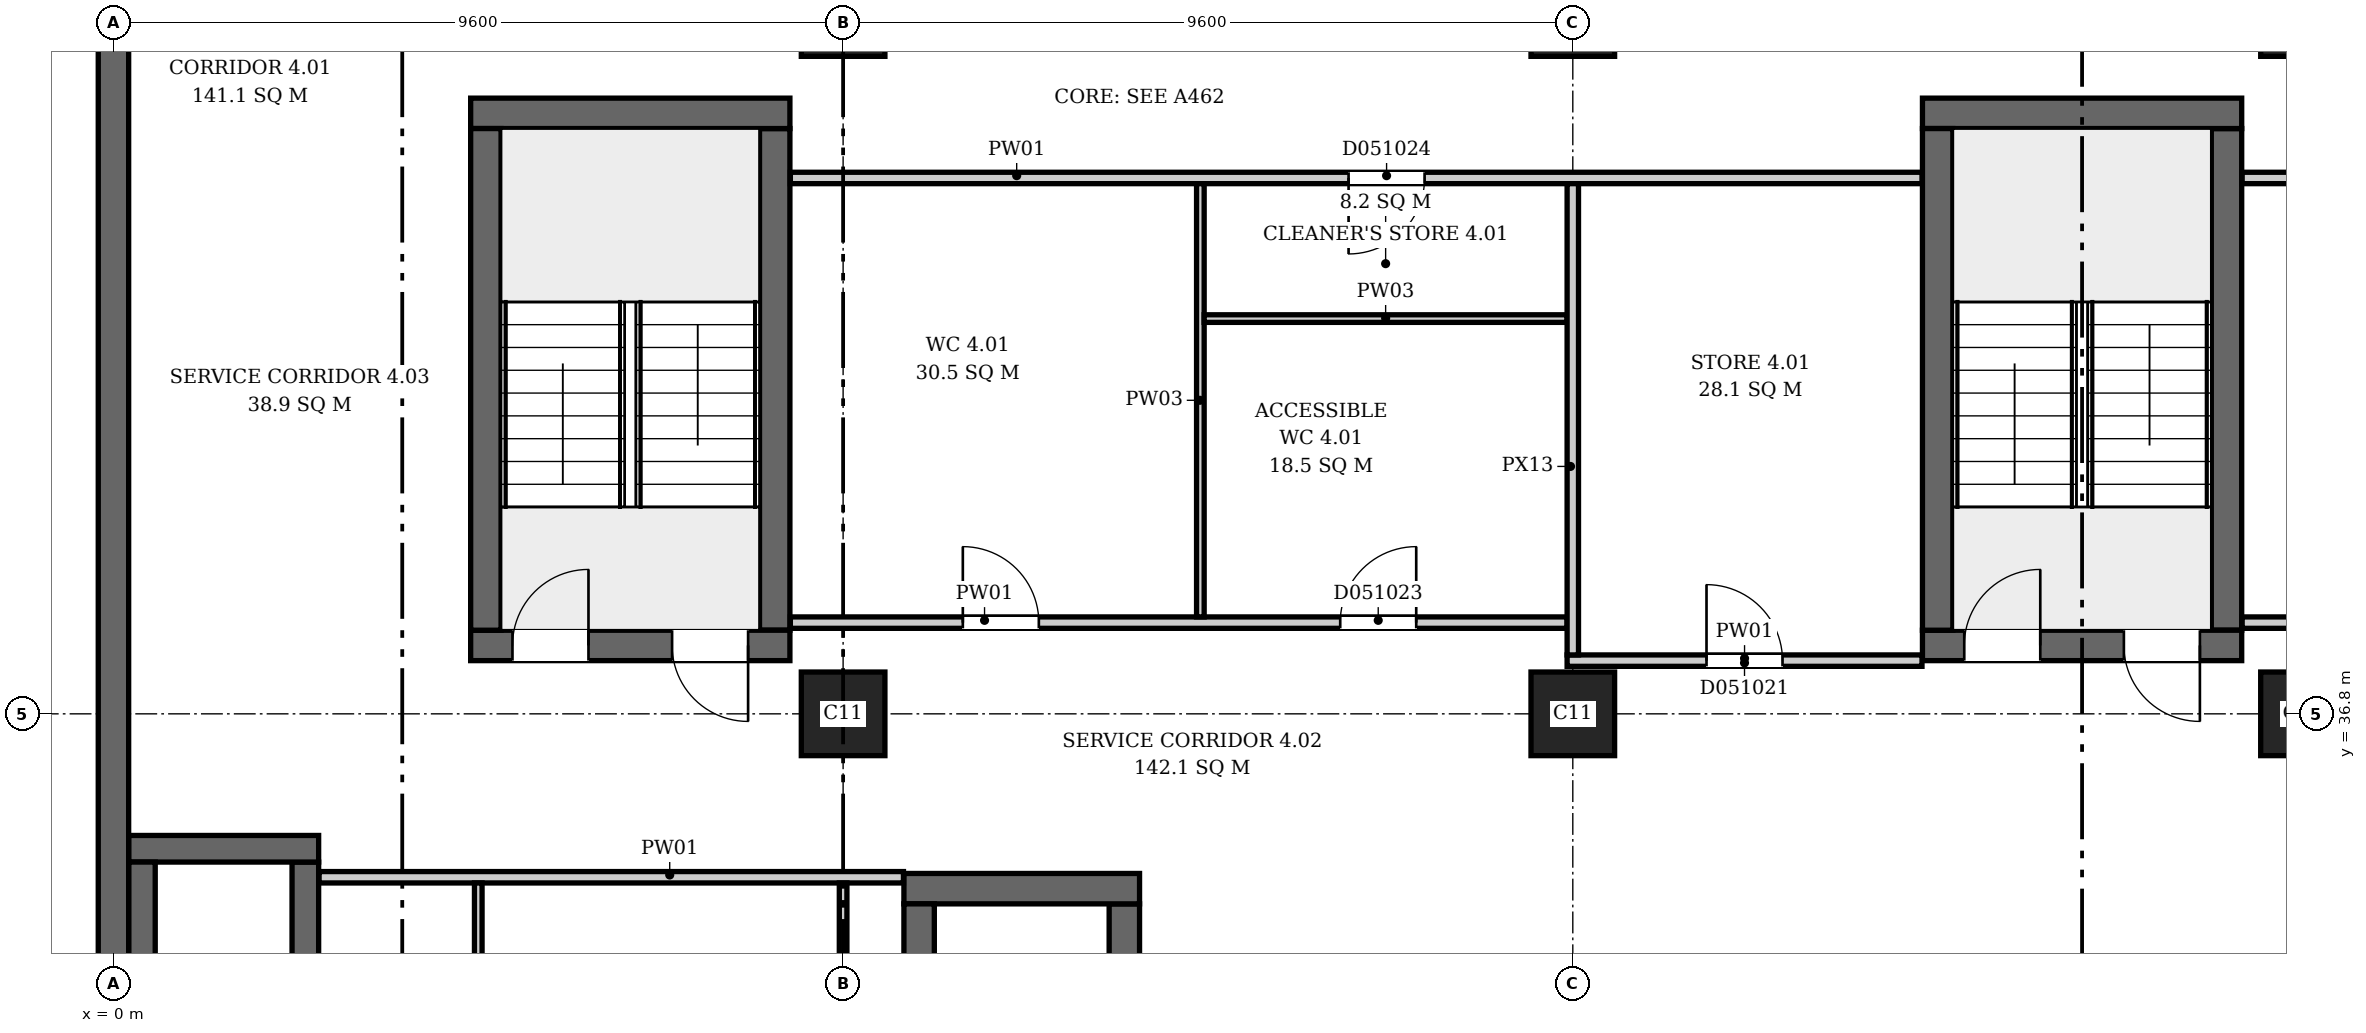
"""IFC4 building model, lengths in metres.
Left out: names, types, materials, properties, quantities, classifications, styles, units other than length and angle.
Written with IfcOpenShell. Run it as: python <this file> out.ifc"""

import sys

from ifc_helpers import new_model, si_unit, direction, frame, frame_2d, origin, origin_2d, place, context, subcontext, project, spatial, rectangle, extrude, element, fill, save


model = new_model("IFC4")
c1 = context("Model", 3, precision=1e-05, world=origin(), true_north=direction((0.0, 1.0)))
c2 = subcontext(c1, "Body", "Model", "MODEL_VIEW")
j1 = project(units=[si_unit("LENGTHUNIT", "METRE"), si_unit("PLANEANGLEUNIT", "RADIAN")], contexts=[c1])
p1 = place(None, origin())
s1 = spatial("IfcSite", under=j1, at=p1, CompositionType="ELEMENT")
p2 = place(p1, origin())
s2 = spatial("IfcBuilding", under=s1, at=p2, CompositionType="ELEMENT")
p3 = place(p2, frame((0.0, 0.0, 26.7)))
s3 = spatial("IfcBuildingStorey", under=s2, at=p3, CompositionType="ELEMENT", Elevation=26.7)
p4 = place(p3, frame((0.0, -0.2, 0.0), z_axis=(0.0, 0.0, 1.0), x_axis=(0.0, 1.0, 0.0)))
e1 = element("IfcWall", 1, at=p4, inside=s3, PredefinedType="SHEAR", context=c2, shape_type="SweptSolid", body=[
    extrude(rectangle(XDim=46.88, YDim=0.4, at=frame_2d((23.44, 0.0))), origin(), (0.0, 0.0, 1.0), 5.2),
])
p5 = place(p3, frame((4.7, 37.7, 0.0), z_axis=(0.0, 0.0, 1.0), x_axis=(1.0, 0.0, 0.0)))
e2 = element("IfcWall", 2, at=p5, inside=s3, PredefinedType="SHEAR", context=c2, shape_type="SweptSolid", body=[
    extrude(rectangle(XDim=4.2, YDim=0.4, at=frame_2d((2.1, 0.0))), origin(), (0.0, 0.0, 1.0), 5.2),
])
p6 = place(p5, frame((0.55, 0.0, 0.0)))
e3 = element("IfcOpeningElement", 3, at=p6, cuts=e2, PredefinedType="OPENING", context=c2, shape_type="SweptSolid", body=[
    extrude(rectangle(XDim=1.0, YDim=2.1, at=frame_2d((0.5, 1.05))), frame((0.0, 0.21, 0.0), z_axis=(0.0, -1.0, 0.0), x_axis=(1.0, 0.0, 0.0)), (0.0, 0.0, 1.0), 0.42),
])
p7 = place(p5, frame((2.65, 0.0, 0.0)))
e4 = element("IfcOpeningElement", 4, at=p7, cuts=e2, PredefinedType="OPENING", context=c2, shape_type="SweptSolid", body=[
    extrude(rectangle(XDim=1.0, YDim=2.1, at=frame_2d((0.5, 1.05))), frame((0.0, 0.21, 0.0), z_axis=(0.0, -1.0, 0.0), x_axis=(1.0, 0.0, 0.0)), (0.0, 0.0, 1.0), 0.42),
])
p8 = place(p3, frame((4.7, 44.7, 0.0), z_axis=(0.0, 0.0, 1.0), x_axis=(1.0, 0.0, 0.0)))
e5 = element("IfcWall", 5, at=p8, inside=s3, PredefinedType="SHEAR", context=c2, shape_type="SweptSolid", body=[
    extrude(rectangle(XDim=4.2, YDim=0.4, at=frame_2d((2.1, 0.0))), origin(), (0.0, 0.0, 1.0), 5.2),
])
for number, where, z_axis, x_axis in (
    (6, (4.9, 37.9, 0.0), (0.0, 0.0, 1.0), (0.0, 1.0, 0.0)),
    (7, (8.7, 37.9, 0.0), (0.0, 0.0, 1.0), (0.0, 1.0, 0.0)),
):
    element("IfcWall", number, at=place(p3, frame(where, z_axis=z_axis, x_axis=x_axis)), inside=s3, PredefinedType="SHEAR", context=c2, shape_type="SweptSolid", body=[
        extrude(rectangle(XDim=6.6, YDim=0.4, at=frame_2d((3.3, 0.0))), origin(), (0.0, 0.0, 1.0), 5.2),
    ])
p9 = place(p3, frame((23.8, 37.7, 0.0), z_axis=(0.0, 0.0, 1.0), x_axis=(1.0, 0.0, 0.0)))
e8 = element("IfcWall", 8, at=p9, inside=s3, PredefinedType="SHEAR", context=c2, shape_type="SweptSolid", body=[
    extrude(rectangle(XDim=4.2, YDim=0.4, at=frame_2d((2.1, 0.0))), origin(), (0.0, 0.0, 1.0), 5.2),
])
p10 = place(p9, frame((0.55, 0.0, 0.0)))
e9 = element("IfcOpeningElement", 9, at=p10, cuts=e8, PredefinedType="OPENING", context=c2, shape_type="SweptSolid", body=[
    extrude(rectangle(XDim=1.0, YDim=2.1, at=frame_2d((0.5, 1.05))), frame((0.0, 0.21, 0.0), z_axis=(0.0, -1.0, 0.0), x_axis=(1.0, 0.0, 0.0)), (0.0, 0.0, 1.0), 0.42),
])
p11 = place(p9, frame((2.65, 0.0, 0.0)))
e10 = element("IfcOpeningElement", 10, at=p11, cuts=e8, PredefinedType="OPENING", context=c2, shape_type="SweptSolid", body=[
    extrude(rectangle(XDim=1.0, YDim=2.1, at=frame_2d((0.5, 1.05))), frame((0.0, 0.21, 0.0), z_axis=(0.0, -1.0, 0.0), x_axis=(1.0, 0.0, 0.0)), (0.0, 0.0, 1.0), 0.42),
])
p12 = place(p3, frame((23.8, 44.7, 0.0), z_axis=(0.0, 0.0, 1.0), x_axis=(1.0, 0.0, 0.0)))
e11 = element("IfcWall", 11, at=p12, inside=s3, PredefinedType="SHEAR", context=c2, shape_type="SweptSolid", body=[
    extrude(rectangle(XDim=4.2, YDim=0.4, at=frame_2d((2.1, 0.0))), origin(), (0.0, 0.0, 1.0), 5.2),
])
for number, where, z_axis, x_axis in (
    (12, (24.0, 37.9, 0.0), (0.0, 0.0, 1.0), (0.0, 1.0, 0.0)),
    (13, (27.8, 37.9, 0.0), (0.0, 0.0, 1.0), (0.0, 1.0, 0.0)),
):
    element("IfcWall", number, at=place(p3, frame(where, z_axis=z_axis, x_axis=x_axis)), inside=s3, PredefinedType="SHEAR", context=c2, shape_type="SweptSolid", body=[
        extrude(rectangle(XDim=6.6, YDim=0.4, at=frame_2d((3.3, 0.0))), origin(), (0.0, 0.0, 1.0), 5.2),
    ])
p13 = place(p3, frame((0.2, 35.025, 0.0), z_axis=(0.0, 0.0, 1.0), x_axis=(1.0, 0.0, 0.0)))
e14 = element("IfcWall", 14, at=p13, inside=s3, PredefinedType="SHEAR", context=c2, shape_type="SweptSolid", body=[
    extrude(rectangle(XDim=2.5, YDim=0.35, at=frame_2d((1.25, 0.0))), origin(), (0.0, 0.0, 1.0), 5.2),
])
for number, where, z_axis, x_axis in (
    (15, (0.375, 31.35, 0.0), (0.0, 0.0, 1.0), (0.0, 1.0, 0.0)),
    (16, (2.525, 31.35, 0.0), (0.0, 0.0, 1.0), (0.0, 1.0, 0.0)),
):
    element("IfcWall", number, at=place(p3, frame(where, z_axis=z_axis, x_axis=x_axis)), inside=s3, PredefinedType="SHEAR", context=c2, shape_type="SweptSolid", body=[
        extrude(rectangle(XDim=3.5, YDim=0.35, at=frame_2d((1.75, 0.0))), origin(), (0.0, 0.0, 1.0), 5.2),
    ])
p14 = place(p3, frame((10.4, 34.5, 0.0), z_axis=(0.0, 0.0, 1.0), x_axis=(1.0, 0.0, 0.0)))
e17 = element("IfcWall", 17, at=p14, inside=s3, PredefinedType="SHEAR", context=c2, shape_type="SweptSolid", body=[
    extrude(rectangle(XDim=3.1, YDim=0.4, at=frame_2d((1.55, 0.0))), origin(), (0.0, 0.0, 1.0), 5.2),
])
for number, where, z_axis, x_axis in (
    (18, (10.6, 30.9, 0.0), (0.0, 0.0, 1.0), (0.0, 1.0, 0.0)),
    (19, (13.3, 30.9, 0.0), (0.0, 0.0, 1.0), (0.0, 1.0, 0.0)),
):
    element("IfcWall", number, at=place(p3, frame(where, z_axis=z_axis, x_axis=x_axis)), inside=s3, PredefinedType="SHEAR", context=c2, shape_type="SweptSolid", body=[
        extrude(rectangle(XDim=3.4, YDim=0.4, at=frame_2d((1.7, 0.0))), origin(), (0.0, 0.0, 1.0), 5.2),
    ])
for number, where, z_axis, x_axis in (
    (20, (9.6, 36.8, 0.0), (0.0, 0.0, 1.0), (1.0, 0.0, 0.0)),
    (21, (19.2, 36.8, 0.0), (0.0, 0.0, 1.0), (1.0, 0.0, 0.0)),
    (22, (28.8, 36.8, 0.0), (0.0, 0.0, 1.0), (1.0, 0.0, 0.0)),
    (23, (9.6, 46.0, 0.0), (0.0, 0.0, 1.0), (1.0, 0.0, 0.0)),
    (24, (19.2, 46.0, 0.0), (0.0, 0.0, 1.0), (1.0, 0.0, 0.0)),
    (25, (28.8, 46.0, 0.0), (0.0, 0.0, 1.0), (1.0, 0.0, 0.0)),
):
    element("IfcColumn", number, at=place(p3, frame(where, z_axis=z_axis, x_axis=x_axis)), inside=s3, PredefinedType="COLUMN", context=c2, shape_type="SweptSolid", body=[
        extrude(rectangle(XDim=1.1, YDim=1.1, at=origin_2d()), origin(), (0.0, 0.0, 1.0), 5.2),
    ])
p15 = place(p3, frame((2.706, 34.65, 0.0), z_axis=(0.0, 0.0, 1.0), x_axis=(1.0, 0.0, 0.0)))
e26 = element("IfcWall", 26, at=p15, inside=s3, PredefinedType="PARTITIONING", context=c2, shape_type="SweptSolid", body=[
    extrude(rectangle(XDim=7.688, YDim=0.15, at=frame_2d((3.844, 0.0))), origin(), (0.0, 0.0, 1.0), 4.85),
])
p16 = place(p3, frame((4.8, 25.175, 0.0), z_axis=(0.0, 0.0, 1.0), x_axis=(0.0, 1.0, 0.0)))
e27 = element("IfcWall", 27, at=p16, inside=s3, PredefinedType="PARTITIONING", context=c2, shape_type="SweptSolid", body=[
    extrude(rectangle(XDim=9.4, YDim=0.1, at=frame_2d((4.7, 0.0))), origin(), (0.0, 0.0, 1.0), 4.85),
])
p17 = place(p3, frame((8.906, 38.0, 0.0), z_axis=(0.0, 0.0, 1.0), x_axis=(1.0, 0.0, 0.0)))
e28 = element("IfcWall", 28, at=p17, inside=s3, PredefinedType="PARTITIONING", context=c2, shape_type="SweptSolid", body=[
    extrude(rectangle(XDim=10.219, YDim=0.15, at=frame_2d((5.109, 0.0))), origin(), (0.0, 0.0, 1.0), 4.85),
])
p18 = place(p17, frame((2.269, 0.0, 0.0)))
e29 = element("IfcOpeningElement", 29, at=p18, cuts=e28, PredefinedType="OPENING", context=c2, shape_type="SweptSolid", body=[
    extrude(rectangle(XDim=1.0, YDim=2.1, at=frame_2d((0.5, 1.05))), frame((0.0, 0.085, 0.0), z_axis=(0.0, -1.0, 0.0), x_axis=(1.0, 0.0, 0.0)), (0.0, 0.0, 1.0), 0.17),
])
p19 = place(p17, frame((7.234, 0.0, 0.0)))
e30 = element("IfcOpeningElement", 30, at=p19, cuts=e28, PredefinedType="OPENING", context=c2, shape_type="SweptSolid", body=[
    extrude(rectangle(XDim=1.0, YDim=2.1, at=frame_2d((0.5, 1.05))), frame((0.0, 0.085, 0.0), z_axis=(0.0, -1.0, 0.0), x_axis=(1.0, 0.0, 0.0)), (0.0, 0.0, 1.0), 0.17),
])
p20 = place(p3, frame((8.906, 43.85, 0.0), z_axis=(0.0, 0.0, 1.0), x_axis=(1.0, 0.0, 0.0)))
e31 = element("IfcWall", 31, at=p20, inside=s3, PredefinedType="PARTITIONING", context=c2, shape_type="SweptSolid", body=[
    extrude(rectangle(XDim=14.888, YDim=0.15, at=frame_2d((7.444, 0.0))), origin(), (0.0, 0.0, 1.0), 4.85),
])
p21 = place(p20, frame((7.344, 0.0, 0.0)))
e32 = element("IfcOpeningElement", 32, at=p21, cuts=e31, PredefinedType="OPENING", context=c2, shape_type="SweptSolid", body=[
    extrude(rectangle(XDim=1.0, YDim=2.1, at=frame_2d((0.5, 1.05))), frame((0.0, 0.085, 0.0), z_axis=(0.0, -1.0, 0.0), x_axis=(1.0, 0.0, 0.0)), (0.0, 0.0, 1.0), 0.17),
])
p22 = place(p3, frame((9.6, 31.075, 0.0), z_axis=(0.0, 0.0, 1.0), x_axis=(0.0, 1.0, 0.0)))
e33 = element("IfcWall", 33, at=p22, inside=s3, PredefinedType="PARTITIONING", context=c2, shape_type="SweptSolid", body=[
    extrude(rectangle(XDim=3.5, YDim=0.1, at=frame_2d((1.75, 0.0))), origin(), (0.0, 0.0, 1.0), 4.45),
])
p23 = place(p3, frame((14.3, 38.075, 0.0), z_axis=(0.0, 0.0, 1.0), x_axis=(0.0, 1.0, 0.0)))
e34 = element("IfcWall", 34, at=p23, inside=s3, PredefinedType="PARTITIONING", context=c2, shape_type="SweptSolid", body=[
    extrude(rectangle(XDim=5.7, YDim=0.1, at=frame_2d((2.85, 0.0))), origin(), (0.0, 0.0, 1.0), 4.85),
])
p24 = place(p3, frame((14.35, 42.0, 0.0), z_axis=(0.0, 0.0, 1.0), x_axis=(1.0, 0.0, 0.0)))
e35 = element("IfcWall", 35, at=p24, inside=s3, PredefinedType="PARTITIONING", context=c2, shape_type="SweptSolid", body=[
    extrude(rectangle(XDim=4.775, YDim=0.1, at=frame_2d((2.387, 0.0))), origin(), (0.0, 0.0, 1.0), 4.85),
])
p25 = place(p3, frame((19.125, 37.5, 0.0), z_axis=(0.0, 0.0, 1.0), x_axis=(1.0, 0.0, 0.0)))
e36 = element("IfcWall", 36, at=p25, inside=s3, PredefinedType="PARTITIONING", context=c2, shape_type="SweptSolid", body=[
    extrude(rectangle(XDim=4.669, YDim=0.15, at=frame_2d((2.334, 0.0))), origin(), (0.0, 0.0, 1.0), 4.85),
])
p26 = place(p25, frame((1.834, 0.0, 0.0)))
e37 = element("IfcOpeningElement", 37, at=p26, cuts=e36, PredefinedType="OPENING", context=c2, shape_type="SweptSolid", body=[
    extrude(rectangle(XDim=1.0, YDim=2.1, at=frame_2d((0.5, 1.05))), frame((0.0, 0.085, 0.0), z_axis=(0.0, -1.0, 0.0), x_axis=(1.0, 0.0, 0.0)), (0.0, 0.0, 1.0), 0.17),
])
p27 = place(p3, frame((19.2, 37.575, 0.0), z_axis=(0.0, 0.0, 1.0), x_axis=(0.0, 1.0, 0.0)))
e38 = element("IfcWall", 38, at=p27, inside=s3, PredefinedType="PARTITIONING", context=c2, shape_type="SweptSolid", body=[
    extrude(rectangle(XDim=6.2, YDim=0.15, at=frame_2d((3.1, 0.0))), origin(), (0.0, 0.0, 1.0), 4.45),
])
p28 = place(p3, frame((28.006, 38.0, 0.0), z_axis=(0.0, 0.0, 1.0), x_axis=(1.0, 0.0, 0.0)))
e39 = element("IfcWall", 39, at=p28, inside=s3, PredefinedType="PARTITIONING", context=c2, shape_type="SweptSolid", body=[
    extrude(rectangle(XDim=1.919, YDim=0.15, at=frame_2d((0.959, 0.0))), origin(), (0.0, 0.0, 1.0), 4.85),
])
p29 = place(p3, frame((28.006, 43.85, 0.0), z_axis=(0.0, 0.0, 1.0), x_axis=(1.0, 0.0, 0.0)))
e40 = element("IfcWall", 40, at=p29, inside=s3, PredefinedType="PARTITIONING", context=c2, shape_type="SweptSolid", body=[
    extrude(rectangle(XDim=29.388, YDim=0.15, at=frame_2d((14.694, 0.0))), origin(), (0.0, 0.0, 1.0), 4.85),
])
p30 = place(p6, origin())
e41 = element("IfcDoor", 41, at=p30, inside=s3, OperationType="SINGLE_SWING_RIGHT", PredefinedType="DOOR", context=c2, shape_type="SweptSolid", body=[
    extrude(rectangle(XDim=1.0, YDim=2.1, at=frame_2d((0.5, 1.05))), frame((0.0, 0.025, 0.0), z_axis=(0.0, -1.0, 0.0), x_axis=(1.0, 0.0, 0.0)), (0.0, 0.0, 1.0), 0.05),
])
fill(e3, e41)
p31 = place(p7, origin())
e42 = element("IfcDoor", 42, at=p31, inside=s3, OperationType="SINGLE_SWING_LEFT", PredefinedType="DOOR", context=c2, shape_type="SweptSolid", body=[
    extrude(rectangle(XDim=1.0, YDim=2.1, at=frame_2d((0.5, 1.05))), frame((0.0, 0.025, 0.0), z_axis=(0.0, -1.0, 0.0), x_axis=(1.0, 0.0, 0.0)), (0.0, 0.0, 1.0), 0.05),
])
fill(e4, e42)
p32 = place(p10, origin())
e43 = element("IfcDoor", 43, at=p32, inside=s3, OperationType="SINGLE_SWING_RIGHT", PredefinedType="DOOR", context=c2, shape_type="SweptSolid", body=[
    extrude(rectangle(XDim=1.0, YDim=2.1, at=frame_2d((0.5, 1.05))), frame((0.0, 0.025, 0.0), z_axis=(0.0, -1.0, 0.0), x_axis=(1.0, 0.0, 0.0)), (0.0, 0.0, 1.0), 0.05),
])
fill(e9, e43)
p33 = place(p11, origin())
e44 = element("IfcDoor", 44, at=p33, inside=s3, OperationType="SINGLE_SWING_LEFT", PredefinedType="DOOR", context=c2, shape_type="SweptSolid", body=[
    extrude(rectangle(XDim=1.0, YDim=2.1, at=frame_2d((0.5, 1.05))), frame((0.0, 0.025, 0.0), z_axis=(0.0, -1.0, 0.0), x_axis=(1.0, 0.0, 0.0)), (0.0, 0.0, 1.0), 0.05),
])
fill(e10, e44)
p34 = place(p26, origin())
e45 = element("IfcDoor", 45, at=p34, inside=s3, OperationType="SINGLE_SWING_LEFT", PredefinedType="DOOR", context=c2, shape_type="SweptSolid", body=[
    extrude(rectangle(XDim=1.0, YDim=2.1, at=frame_2d((0.5, 1.05))), frame((0.0, 0.025, 0.0), z_axis=(0.0, -1.0, 0.0), x_axis=(1.0, 0.0, 0.0)), (0.0, 0.0, 1.0), 0.05),
])
fill(e37, e45)
p35 = place(p18, origin())
e46 = element("IfcDoor", 46, at=p35, inside=s3, OperationType="SINGLE_SWING_LEFT", PredefinedType="DOOR", context=c2, shape_type="SweptSolid", body=[
    extrude(rectangle(XDim=1.0, YDim=2.1, at=frame_2d((0.5, 1.05))), frame((0.0, 0.025, 0.0), z_axis=(0.0, -1.0, 0.0), x_axis=(1.0, 0.0, 0.0)), (0.0, 0.0, 1.0), 0.05),
])
fill(e29, e46)
p36 = place(p19, origin())
e47 = element("IfcDoor", 47, at=p36, inside=s3, OperationType="SINGLE_SWING_RIGHT", PredefinedType="DOOR", context=c2, shape_type="SweptSolid", body=[
    extrude(rectangle(XDim=1.0, YDim=2.1, at=frame_2d((0.5, 1.05))), frame((0.0, 0.025, 0.0), z_axis=(0.0, -1.0, 0.0), x_axis=(1.0, 0.0, 0.0)), (0.0, 0.0, 1.0), 0.05),
])
fill(e30, e47)
p37 = place(p21, origin())
e48 = element("IfcDoor", 48, at=p37, inside=s3, OperationType="SINGLE_SWING_LEFT", PredefinedType="DOOR", context=c2, shape_type="SweptSolid", body=[
    extrude(rectangle(XDim=1.0, YDim=2.1, at=frame_2d((0.5, 1.05))), frame((0.0, 0.025, 0.0), z_axis=(0.0, -1.0, 0.0), x_axis=(1.0, 0.0, 0.0)), (0.0, 0.0, 1.0), 0.05),
])
fill(e32, e48)
save(model, sys.argv[1])
